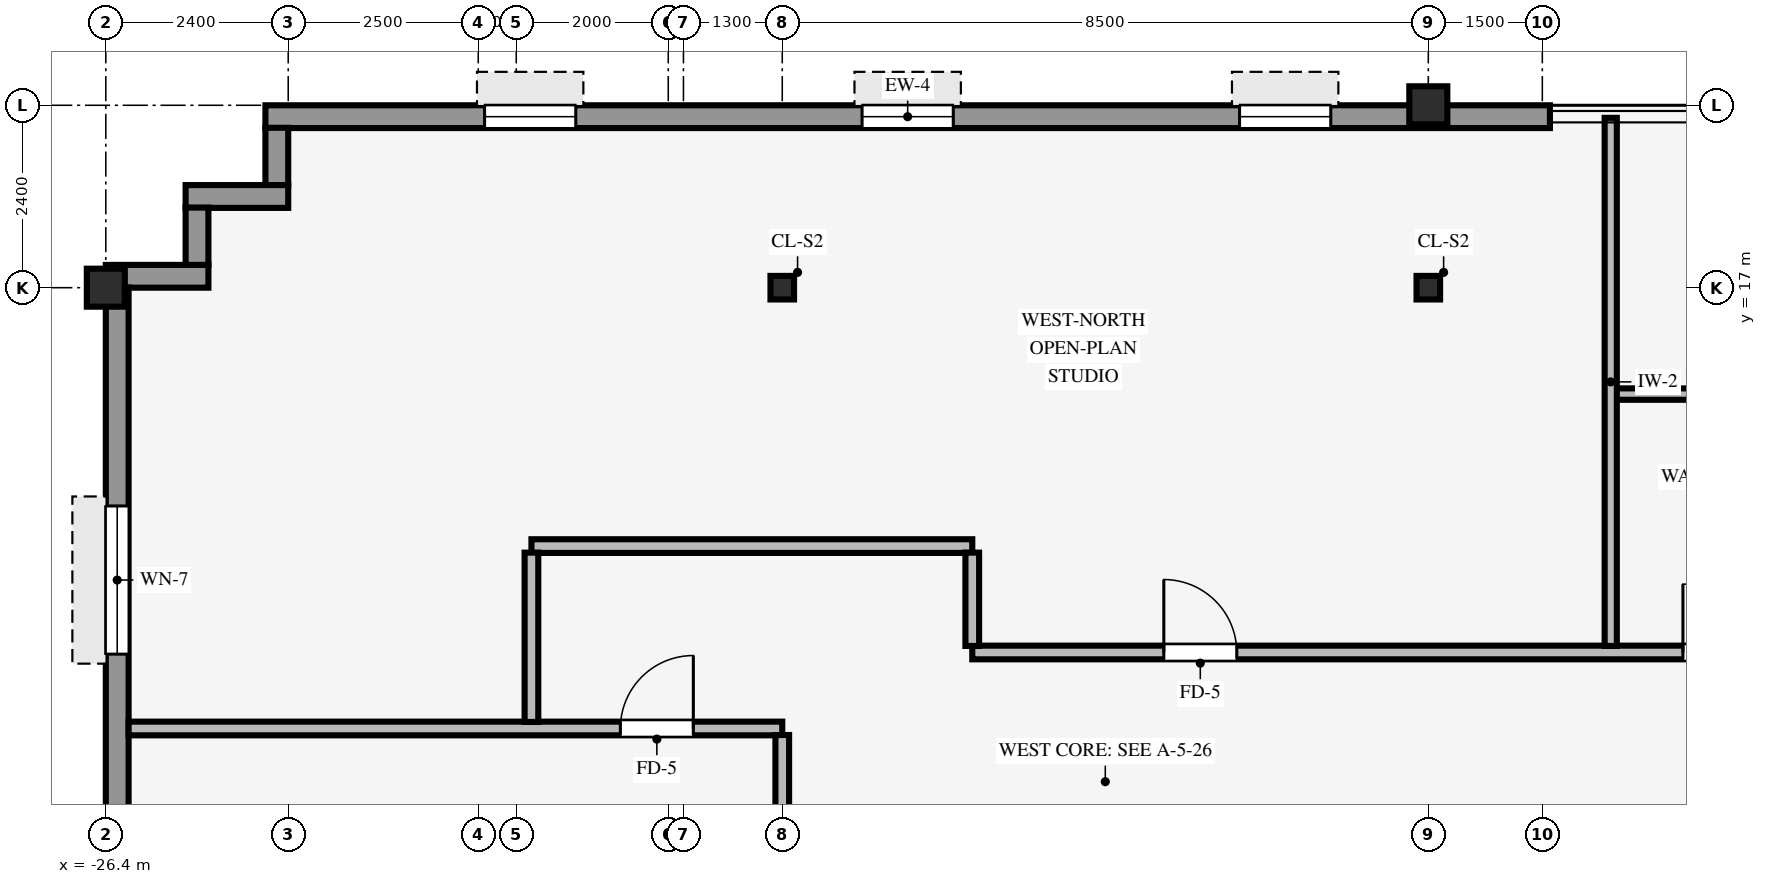
"""IFC4 building model, lengths in metres.
Left out: names, types, materials, properties, quantities, classifications, styles, units other than length and angle.
Written with IfcOpenShell. Run it as: python <this file> out.ifc"""

import sys

from ifc_helpers import new_model, si_unit, direction, frame, frame_2d, origin, origin_2d, place, context, subcontext, project, spatial, rectangle, hollow_rectangle, i_section, extrude, source, transform, mapped, element, fill, save


model = new_model("IFC4")
c1 = context("Model", 3, precision=1e-05, world=origin(), true_north=direction((0.0, 1.0)))
c2 = subcontext(c1, "Body", "Model", "MODEL_VIEW")
j1 = project(units=[si_unit("LENGTHUNIT", "METRE"), si_unit("PLANEANGLEUNIT", "RADIAN")], contexts=[c1])
p1 = place(None, origin())
s1 = spatial("IfcSite", under=j1, at=p1, CompositionType="ELEMENT")
p2 = place(p1, origin())
s2 = spatial("IfcBuilding", under=s1, at=p2, CompositionType="ELEMENT")
p3 = place(p2, frame((0.0, 0.0, 227.4)))
s3 = spatial("IfcBuildingStorey", under=s2, at=p3, CompositionType="ELEMENT", Elevation=227.4)
for number, where, z_axis, x_axis in (
    (1, (-26.4, 17.0, 0.0), (0.0, 0.0, 1.0), (1.0, 0.0, 0.0)),
    (2, (-9.0, 19.4, 0.0), (0.0, 0.0, 1.0), (1.0, 0.0, 0.0)),
):
    element("IfcColumn", number, at=place(p3, frame(where, z_axis=z_axis, x_axis=x_axis)), inside=s3, PredefinedType="COLUMN", context=c2, shape_type="SweptSolid", body=[
        extrude(hollow_rectangle(XDim=0.5, YDim=0.5, WallThickness=0.032, InnerFilletRadius=0.032, OuterFilletRadius=0.064, at=origin_2d()), origin(), (0.0, 0.0, 1.0), 3.37),
    ])
for number, where, z_axis, x_axis in (
    (3, (-17.5, 17.0, 0.0), (0.0, 0.0, 1.0), (1.0, 0.0, 0.0)),
    (4, (-9.0, 17.0, 0.0), (0.0, 0.0, 1.0), (1.0, 0.0, 0.0)),
):
    element("IfcColumn", number, at=place(p3, frame(where, z_axis=z_axis, x_axis=x_axis)), inside=s3, PredefinedType="COLUMN", context=c2, shape_type="SweptSolid", body=[
        extrude(i_section(OverallWidth=0.31, OverallDepth=0.31, WebThickness=0.015, FlangeThickness=0.015, FilletRadius=0.015, at=origin_2d()), origin(), (0.0, 0.0, 1.0), 3.37),
    ])
p4 = place(p3, frame((-24.3, 19.25, 0.0), z_axis=(0.0, 0.0, 1.0), x_axis=(1.0, 0.0, 0.0)))
e5 = element("IfcWall", 5, at=p4, inside=s3, PredefinedType="STANDARD", context=c2, shape_type="SweptSolid", body=[
    extrude(rectangle(XDim=16.9, YDim=0.3, at=frame_2d((8.45, 0.0))), origin(), (0.0, 0.0, 1.0), 2.705),
])
p5 = place(p4, frame((2.883, 0.0, 0.8)))
e6 = element("IfcOpeningElement", 6, at=p5, cuts=e5, PredefinedType="OPENING", context=c2, shape_type="SweptSolid", body=[
    extrude(rectangle(XDim=1.2, YDim=1.48, at=frame_2d((0.6, 0.74))), frame((0.0, 0.16, 0.0), z_axis=(0.0, -1.0, 0.0), x_axis=(1.0, 0.0, 0.0)), (0.0, 0.0, 1.0), 0.32),
])
p6 = place(p4, frame((7.85, 0.0, 0.8)))
e7 = element("IfcOpeningElement", 7, at=p6, cuts=e5, PredefinedType="OPENING", context=c2, shape_type="SweptSolid", body=[
    extrude(rectangle(XDim=1.2, YDim=1.48, at=frame_2d((0.6, 0.74))), frame((0.0, 0.16, 0.0), z_axis=(0.0, -1.0, 0.0), x_axis=(1.0, 0.0, 0.0)), (0.0, 0.0, 1.0), 0.32),
])
p7 = place(p4, frame((12.817, 0.0, 0.8)))
e8 = element("IfcOpeningElement", 8, at=p7, cuts=e5, PredefinedType="OPENING", context=c2, shape_type="SweptSolid", body=[
    extrude(rectangle(XDim=1.2, YDim=1.48, at=frame_2d((0.6, 0.74))), frame((0.0, 0.16, 0.0), z_axis=(0.0, -1.0, 0.0), x_axis=(1.0, 0.0, 0.0)), (0.0, 0.0, 1.0), 0.32),
])
p8 = place(p3, frame((-24.15, 18.346, 0.0), z_axis=(0.0, 0.0, 1.0), x_axis=(0.0, 1.0, 0.0)))
e9 = element("IfcWall", 9, at=p8, inside=s3, PredefinedType="STANDARD", context=c2, shape_type="SweptSolid", body=[
    extrude(rectangle(XDim=0.758, YDim=0.3, at=frame_2d((0.379, 0.0))), origin(), (0.0, 0.0, 1.0), 2.892),
])
p9 = place(p3, frame((-25.35, 18.2, 0.0), z_axis=(0.0, 0.0, 1.0), x_axis=(1.0, 0.0, 0.0)))
e10 = element("IfcWall", 10, at=p9, inside=s3, PredefinedType="STANDARD", context=c2, shape_type="SweptSolid", body=[
    extrude(rectangle(XDim=1.35, YDim=0.3, at=frame_2d((0.675, 0.0))), origin(), (0.0, 0.0, 1.0), 2.892),
])
p10 = place(p3, frame((-25.2, 17.296, 0.0), z_axis=(0.0, 0.0, 1.0), x_axis=(0.0, 1.0, 0.0)))
e11 = element("IfcWall", 11, at=p10, inside=s3, PredefinedType="STANDARD", context=c2, shape_type="SweptSolid", body=[
    extrude(rectangle(XDim=0.758, YDim=0.3, at=frame_2d((0.379, 0.0))), origin(), (0.0, 0.0, 1.0), 2.892),
])
p11 = place(p3, frame((-26.4, 17.15, 0.0), z_axis=(0.0, 0.0, 1.0), x_axis=(1.0, 0.0, 0.0)))
e12 = element("IfcWall", 12, at=p11, inside=s3, PredefinedType="STANDARD", context=c2, shape_type="SweptSolid", body=[
    extrude(rectangle(XDim=1.35, YDim=0.3, at=frame_2d((0.675, 0.0))), origin(), (0.0, 0.0, 1.0), 2.892),
])
p12 = place(p3, frame((-26.25, 3.6, 0.0), z_axis=(0.0, 0.0, 1.0), x_axis=(0.0, 1.0, 0.0)))
e13 = element("IfcWall", 13, at=p12, inside=s3, PredefinedType="STANDARD", context=c2, shape_type="SweptSolid", body=[
    extrude(rectangle(XDim=13.404, YDim=0.3, at=frame_2d((6.702, 0.0))), origin(), (0.0, 0.0, 1.0), 2.705),
])
p13 = place(p12, frame((2.876, 0.0, 0.8)))
e14 = element("IfcOpeningElement", 14, at=p13, cuts=e13, PredefinedType="OPENING", context=c2, shape_type="SweptSolid", body=[
    extrude(rectangle(XDim=1.95, YDim=1.48, at=frame_2d((0.975, 0.74))), frame((0.0, 0.16, 0.0), z_axis=(0.0, -1.0, 0.0), x_axis=(1.0, 0.0, 0.0)), (0.0, 0.0, 1.0), 0.32),
])
p14 = place(p12, frame((8.578, 0.0, 0.8)))
e15 = element("IfcOpeningElement", 15, at=p14, cuts=e13, PredefinedType="OPENING", context=c2, shape_type="SweptSolid", body=[
    extrude(rectangle(XDim=1.95, YDim=1.48, at=frame_2d((0.975, 0.74))), frame((0.0, 0.16, 0.0), z_axis=(0.0, -1.0, 0.0), x_axis=(1.0, 0.0, 0.0)), (0.0, 0.0, 1.0), 0.32),
])
p15 = place(p3, frame((-26.1, 11.2, 0.0), z_axis=(0.0, 0.0, 1.0), x_axis=(1.0, 0.0, 0.0)))
e16 = element("IfcWall", 16, at=p15, inside=s3, PredefinedType="PARTITIONING", context=c2, shape_type="SweptSolid", body=[
    extrude(rectangle(XDim=8.6, YDim=0.18, at=frame_2d((4.3, 0.0))), origin(), (0.0, 0.0, 1.0), 3.36),
])
p16 = place(p15, frame((6.47, 0.0, 0.0)))
e17 = element("IfcOpeningElement", 17, at=p16, cuts=e16, PredefinedType="OPENING", context=c2, shape_type="SweptSolid", body=[
    extrude(rectangle(XDim=0.96, YDim=2.1, at=frame_2d((0.48, 1.05))), frame((0.0, 0.1, 0.0), z_axis=(0.0, -1.0, 0.0), x_axis=(1.0, 0.0, 0.0)), (0.0, 0.0, 1.0), 0.2),
])
p17 = place(p3, frame((-15.0, 12.2, 0.0), z_axis=(0.0, 0.0, 1.0), x_axis=(1.0, 0.0, 0.0)))
e18 = element("IfcWall", 18, at=p17, inside=s3, PredefinedType="PARTITIONING", context=c2, shape_type="SweptSolid", body=[
    extrude(rectangle(XDim=30.8, YDim=0.18, at=frame_2d((15.4, 0.0))), origin(), (0.0, 0.0, 1.0), 3.36),
])
p18 = place(p17, frame((26.92, 0.0, 0.0)))
e19 = element("IfcOpeningElement", 19, at=p18, cuts=e18, PredefinedType="OPENING", context=c2, shape_type="SweptSolid", body=[
    extrude(rectangle(XDim=0.96, YDim=2.1, at=frame_2d((0.48, 1.05))), frame((0.0, 0.1, 0.0), z_axis=(0.0, -1.0, 0.0), x_axis=(1.0, 0.0, 0.0)), (0.0, 0.0, 1.0), 0.2),
])
p19 = place(p17, frame((2.52, 0.0, 0.0)))
e20 = element("IfcOpeningElement", 20, at=p19, cuts=e18, PredefinedType="OPENING", context=c2, shape_type="SweptSolid", body=[
    extrude(rectangle(XDim=0.96, YDim=2.1, at=frame_2d((0.48, 1.05))), frame((0.0, 0.1, 0.0), z_axis=(0.0, -1.0, 0.0), x_axis=(1.0, 0.0, 0.0)), (0.0, 0.0, 1.0), 0.2),
])
p20 = place(p17, frame((19.22, 0.0, 0.0)))
e21 = element("IfcOpeningElement", 21, at=p20, cuts=e18, PredefinedType="OPENING", context=c2, shape_type="SweptSolid", body=[
    extrude(rectangle(XDim=0.96, YDim=2.1, at=frame_2d((0.48, 1.05))), frame((0.0, 0.1, 0.0), z_axis=(0.0, -1.0, 0.0), x_axis=(1.0, 0.0, 0.0)), (0.0, 0.0, 1.0), 0.2),
])
p21 = place(p17, frame((9.35, 0.0, 0.0)))
e22 = element("IfcOpeningElement", 22, at=p21, cuts=e18, PredefinedType="OPENING", context=c2, shape_type="SweptSolid", body=[
    extrude(rectangle(XDim=0.9, YDim=2.1, at=frame_2d((0.45, 1.05))), frame((0.0, 0.1, 0.0), z_axis=(0.0, -1.0, 0.0), x_axis=(1.0, 0.0, 0.0)), (0.0, 0.0, 1.0), 0.2),
])
p22 = place(p17, frame((12.15, 0.0, 0.0)))
e23 = element("IfcOpeningElement", 23, at=p22, cuts=e18, PredefinedType="OPENING", context=c2, shape_type="SweptSolid", body=[
    extrude(rectangle(XDim=0.9, YDim=2.1, at=frame_2d((0.45, 1.05))), frame((0.0, 0.1, 0.0), z_axis=(0.0, -1.0, 0.0), x_axis=(1.0, 0.0, 0.0)), (0.0, 0.0, 1.0), 0.2),
])
p23 = place(p17, frame((16.25, 0.0, 0.0)))
e24 = element("IfcOpeningElement", 24, at=p23, cuts=e18, PredefinedType="OPENING", context=c2, shape_type="SweptSolid", body=[
    extrude(rectangle(XDim=0.9, YDim=2.1, at=frame_2d((0.45, 1.05))), frame((0.0, 0.1, 0.0), z_axis=(0.0, -1.0, 0.0), x_axis=(1.0, 0.0, 0.0)), (0.0, 0.0, 1.0), 0.2),
])
p24 = place(p3, frame((-20.8, 13.6, 0.0), z_axis=(0.0, 0.0, 1.0), x_axis=(1.0, 0.0, 0.0)))
e25 = element("IfcWall", 25, at=p24, inside=s3, PredefinedType="PARTITIONING", context=c2, shape_type="SweptSolid", body=[
    extrude(rectangle(XDim=5.8, YDim=0.18, at=frame_2d((2.9, 0.0))), origin(), (0.0, 0.0, 1.0), 3.049),
])
p25 = place(p3, frame((-6.529, 15.6, 0.0), z_axis=(0.0, 0.0, 1.0), x_axis=(1.0, 0.0, 0.0)))
e26 = element("IfcWall", 26, at=p25, inside=s3, PredefinedType="PARTITIONING", context=c2, shape_type="SweptSolid", body=[
    extrude(rectangle(XDim=5.529, YDim=0.15, at=frame_2d((2.765, 0.0))), origin(), (0.0, 0.0, 1.0), 3.36),
])
p26 = place(p3, frame((-20.8, 11.286, 0.0), z_axis=(0.0, 0.0, 1.0), x_axis=(0.0, 1.0, 0.0)))
e27 = element("IfcWall", 27, at=p26, inside=s3, PredefinedType="PARTITIONING", context=c2, shape_type="SweptSolid", body=[
    extrude(rectangle(XDim=2.228, YDim=0.18, at=frame_2d((1.114, 0.0))), origin(), (0.0, 0.0, 1.0), 3.36),
])
p27 = place(p3, frame((-17.5, 9.996, 0.0), z_axis=(0.0, 0.0, 1.0), x_axis=(0.0, 1.0, 0.0)))
e28 = element("IfcWall", 28, at=p27, inside=s3, PredefinedType="PARTITIONING", context=c2, shape_type="SweptSolid", body=[
    extrude(rectangle(XDim=1.118, YDim=0.18, at=frame_2d((0.559, 0.0))), origin(), (0.0, 0.0, 1.0), 2.892),
])
p28 = place(p3, frame((-15.0, 12.286, 0.0), z_axis=(0.0, 0.0, 1.0), x_axis=(0.0, 1.0, 0.0)))
e29 = element("IfcWall", 29, at=p28, inside=s3, PredefinedType="PARTITIONING", context=c2, shape_type="SweptSolid", body=[
    extrude(rectangle(XDim=1.228, YDim=0.18, at=frame_2d((0.614, 0.0))), origin(), (0.0, 0.0, 1.0), 3.36),
])
p29 = place(p3, frame((-6.6, 12.286, 0.0), z_axis=(0.0, 0.0, 1.0), x_axis=(0.0, 1.0, 0.0)))
e30 = element("IfcWall", 30, at=p29, inside=s3, PredefinedType="PARTITIONING", context=c2, shape_type="SweptSolid", body=[
    extrude(rectangle(XDim=6.949, YDim=0.16, at=frame_2d((3.475, 0.0))), origin(), (0.0, 0.0, 1.0), 3.36),
])
m1 = source(origin(), c2, "Body", "SweptSolid", [
    extrude(rectangle(XDim=1.2, YDim=1.48, at=frame_2d((0.6, 0.74))), frame((0.0, 0.03, 0.0), z_axis=(0.0, -1.0, 0.0), x_axis=(1.0, 0.0, 0.0)), (0.0, 0.0, 1.0), 0.06),
])
p30 = place(p5, origin())
e31 = element("IfcWindow", 31, at=p30, inside=s3, PartitioningType="SINGLE_PANEL", PredefinedType="WINDOW", context=c2, shape_type="MappedRepresentation", body=[
    mapped(m1, transform((0.0, 0.0, 0.0), scale=1.0)),
])
fill(e6, e31)
p31 = place(p6, origin())
e32 = element("IfcWindow", 32, at=p31, inside=s3, PartitioningType="SINGLE_PANEL", PredefinedType="WINDOW", context=c2, shape_type="MappedRepresentation", body=[
    mapped(m1, transform((0.0, 0.0, 0.0), scale=1.0)),
])
fill(e7, e32)
p32 = place(p7, origin())
e33 = element("IfcWindow", 33, at=p32, inside=s3, PartitioningType="SINGLE_PANEL", PredefinedType="WINDOW", context=c2, shape_type="MappedRepresentation", body=[
    mapped(m1, transform((0.0, 0.0, 0.0), scale=1.0)),
])
fill(e8, e33)
m2 = source(origin(), c2, "Body", "SweptSolid", [
    extrude(rectangle(XDim=1.95, YDim=1.48, at=frame_2d((0.975, 0.74))), frame((0.0, 0.03, 0.0), z_axis=(0.0, -1.0, 0.0), x_axis=(1.0, 0.0, 0.0)), (0.0, 0.0, 1.0), 0.06),
])
p33 = place(p14, origin())
e34 = element("IfcWindow", 34, at=p33, inside=s3, PartitioningType="SINGLE_PANEL", PredefinedType="WINDOW", context=c2, shape_type="MappedRepresentation", body=[
    mapped(m2, transform((0.0, 0.0, 0.0), scale=1.0)),
])
fill(e15, e34)
m3 = source(origin(), c2, "Body", "SweptSolid", [
    extrude(rectangle(XDim=0.96, YDim=2.1, at=frame_2d((0.48, 1.05))), frame((0.0, 0.025, 0.0), z_axis=(0.0, -1.0, 0.0), x_axis=(1.0, 0.0, 0.0)), (0.0, 0.0, 1.0), 0.05),
])
p34 = place(p19, origin())
e35 = element("IfcDoor", 35, at=p34, inside=s3, OperationType="SINGLE_SWING_LEFT", PredefinedType="DOOR", context=c2, shape_type="MappedRepresentation", body=[
    mapped(m3, transform((0.0, 0.0, 0.0), scale=1.0)),
])
fill(e20, e35)
p35 = place(p16, origin())
e36 = element("IfcDoor", 36, at=p35, inside=s3, OperationType="SINGLE_SWING_RIGHT", PredefinedType="DOOR", context=c2, shape_type="MappedRepresentation", body=[
    mapped(m3, transform((0.0, 0.0, 0.0), scale=1.0)),
])
fill(e17, e36)
m4 = source(origin(), c2, "Body", "SweptSolid", [
    extrude(rectangle(XDim=0.9, YDim=2.1, at=frame_2d((0.45, 1.05))), frame((0.0, 0.025, 0.0), z_axis=(0.0, -1.0, 0.0), x_axis=(1.0, 0.0, 0.0)), (0.0, 0.0, 1.0), 0.05),
])
p36 = place(p21, origin())
e37 = element("IfcDoor", 37, at=p36, inside=s3, OperationType="SINGLE_SWING_LEFT", PredefinedType="DOOR", context=c2, shape_type="MappedRepresentation", body=[
    mapped(m4, transform((0.0, 0.0, 0.0), scale=1.0)),
])
fill(e22, e37)
save(model, sys.argv[1])
